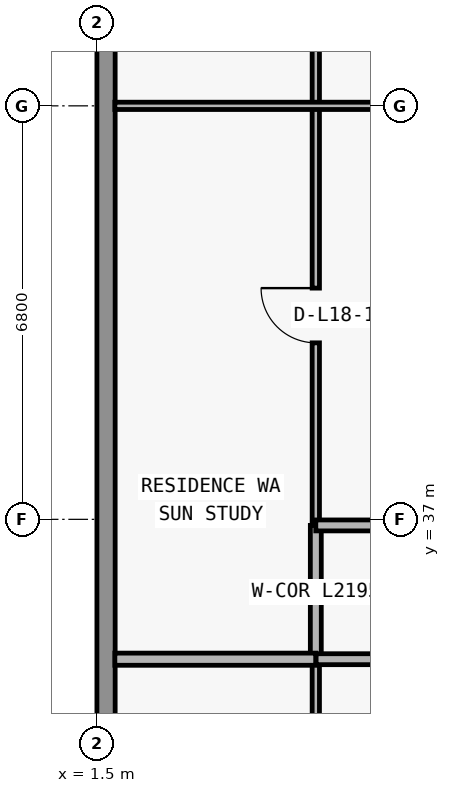
"""IFC4 building model, lengths in metres.
Left out: names, types, materials, properties, quantities, classifications, styles, units other than length and angle.
Written with IfcOpenShell. Run it as: python <this file> out.ifc"""

import sys

from ifc_helpers import new_model, si_unit, direction, frame, frame_2d, origin, place, context, subcontext, project, spatial, rectangle, extrude, element, fill, save


model = new_model("IFC4")
c1 = context("Model", 3, precision=1e-05, world=origin(), true_north=direction((0.0, 1.0)))
c2 = subcontext(c1, "Body", "Model", "MODEL_VIEW")
j1 = project(units=[si_unit("LENGTHUNIT", "METRE"), si_unit("PLANEANGLEUNIT", "RADIAN")], contexts=[c1])
p1 = place(None, origin())
s1 = spatial("IfcSite", under=j1, at=p1, CompositionType="ELEMENT")
p2 = place(p1, origin())
s2 = spatial("IfcBuilding", under=s1, at=p2, CompositionType="ELEMENT")
p3 = place(p2, frame((0.0, 0.0, 69.6)))
s3 = spatial("IfcBuildingStorey", under=s2, at=p3, CompositionType="ELEMENT", Elevation=69.6)
p4 = place(p3, frame((1.65, 26.8, 0.0), z_axis=(0.0, 0.0, 1.0), x_axis=(0.0, 1.0, 0.0)))
e1 = element("IfcWall", 1, at=p4, inside=s3, PredefinedType="STANDARD", context=c2, shape_type="SweptSolid", body=[
    extrude(rectangle(XDim=20.6, YDim=0.3, at=frame_2d((10.3, 0.0))), origin(), (0.0, 0.0, 1.0), 3.05),
])
p5 = place(p3, frame((5.1, 26.44, 0.0), z_axis=(0.0, 0.0, 1.0), x_axis=(0.0, 1.0, 0.0)))
e2 = element("IfcWall", 2, at=p5, inside=s3, PredefinedType="PARTITIONING", context=c2, shape_type="SweptSolid", body=[
    extrude(rectangle(XDim=8.26, YDim=0.12, at=frame_2d((4.13, 0.0))), origin(), (0.0, 0.0, 1.0), 3.05),
])
p6 = place(p3, frame((5.1, 34.705, 0.0), z_axis=(0.0, 0.0, 1.0), x_axis=(0.0, 1.0, 0.0)))
e3 = element("IfcWall", 3, at=p6, inside=s3, PredefinedType="PARTITIONING", context=c2, shape_type="SweptSolid", body=[
    extrude(rectangle(XDim=2.195, YDim=0.18, at=frame_2d((1.097, 0.0))), origin(), (0.0, 0.0, 1.0), 3.05),
])
p7 = place(p3, frame((5.1, 36.905, 0.0), z_axis=(0.0, 0.0, 1.0), x_axis=(0.0, 1.0, 0.0)))
e4 = element("IfcWall", 4, at=p7, inside=s3, PredefinedType="PARTITIONING", context=c2, shape_type="SweptSolid", body=[
    extrude(rectangle(XDim=10.375, YDim=0.12, at=frame_2d((5.188, 0.0))), origin(), (0.0, 0.0, 1.0), 3.05),
])
p8 = place(p7, frame((2.998, 0.0, 0.0)))
e5 = element("IfcOpeningElement", 5, at=p8, cuts=e4, PredefinedType="OPENING", context=c2, shape_type="SweptSolid", body=[
    extrude(rectangle(XDim=0.9, YDim=2.15, at=frame_2d((0.45, 1.075))), frame((0.0, 0.07, 0.0), z_axis=(0.0, -1.0, 0.0), x_axis=(1.0, 0.0, 0.0)), (0.0, 0.0, 1.0), 0.14),
])
p9 = place(p7, frame((8.185, 0.0, 0.0)))
e6 = element("IfcOpeningElement", 6, at=p9, cuts=e4, PredefinedType="OPENING", context=c2, shape_type="SweptSolid", body=[
    extrude(rectangle(XDim=0.9, YDim=2.15, at=frame_2d((0.45, 1.075))), frame((0.0, 0.07, 0.0), z_axis=(0.0, -1.0, 0.0), x_axis=(1.0, 0.0, 0.0)), (0.0, 0.0, 1.0), 0.14),
])
p10 = place(p3, frame((1.795, 34.7, 0.0), z_axis=(0.0, 0.0, 1.0), x_axis=(1.0, 0.0, 0.0)))
e7 = element("IfcWall", 7, at=p10, inside=s3, PredefinedType="PARTITIONING", context=c2, shape_type="SweptSolid", body=[
    extrude(rectangle(XDim=3.305, YDim=0.2, at=frame_2d((1.653, 0.0))), origin(), (0.0, 0.0, 1.0), 3.05),
])
p11 = place(p3, frame((5.105, 34.7, 0.0), z_axis=(0.0, 0.0, 1.0), x_axis=(1.0, 0.0, 0.0)))
e8 = element("IfcWall", 8, at=p11, inside=s3, PredefinedType="PARTITIONING", context=c2, shape_type="SweptSolid", body=[
    extrude(rectangle(XDim=67.595, YDim=0.18, at=frame_2d((33.797, 0.0))), origin(), (0.0, 0.0, 1.0), 3.05),
])
p12 = place(p11, frame((7.67, 0.0, 0.0)))
e9 = element("IfcOpeningElement", 9, at=p12, cuts=e8, PredefinedType="OPENING", context=c2, shape_type="SweptSolid", body=[
    extrude(rectangle(XDim=1.0, YDim=2.2, at=frame_2d((0.5, 1.1))), frame((0.0, 0.1, 0.0), z_axis=(0.0, -1.0, 0.0), x_axis=(1.0, 0.0, 0.0)), (0.0, 0.0, 1.0), 0.2),
])
p13 = place(p11, frame((16.07, 0.0, 0.0)))
e10 = element("IfcOpeningElement", 10, at=p13, cuts=e8, PredefinedType="OPENING", context=c2, shape_type="SweptSolid", body=[
    extrude(rectangle(XDim=1.0, YDim=2.2, at=frame_2d((0.5, 1.1))), frame((0.0, 0.1, 0.0), z_axis=(0.0, -1.0, 0.0), x_axis=(1.0, 0.0, 0.0)), (0.0, 0.0, 1.0), 0.2),
])
p14 = place(p11, frame((24.47, 0.0, 0.0)))
e11 = element("IfcOpeningElement", 11, at=p14, cuts=e8, PredefinedType="OPENING", context=c2, shape_type="SweptSolid", body=[
    extrude(rectangle(XDim=1.0, YDim=2.2, at=frame_2d((0.5, 1.1))), frame((0.0, 0.1, 0.0), z_axis=(0.0, -1.0, 0.0), x_axis=(1.0, 0.0, 0.0)), (0.0, 0.0, 1.0), 0.2),
])
p15 = place(p11, frame((32.47, 0.0, 0.0)))
e12 = element("IfcOpeningElement", 12, at=p15, cuts=e8, PredefinedType="OPENING", context=c2, shape_type="SweptSolid", body=[
    extrude(rectangle(XDim=1.0, YDim=2.2, at=frame_2d((0.5, 1.1))), frame((0.0, 0.1, 0.0), z_axis=(0.0, -1.0, 0.0), x_axis=(1.0, 0.0, 0.0)), (0.0, 0.0, 1.0), 0.2),
])
p16 = place(p11, frame((40.47, 0.0, 0.0)))
e13 = element("IfcOpeningElement", 13, at=p16, cuts=e8, PredefinedType="OPENING", context=c2, shape_type="SweptSolid", body=[
    extrude(rectangle(XDim=1.0, YDim=2.2, at=frame_2d((0.5, 1.1))), frame((0.0, 0.1, 0.0), z_axis=(0.0, -1.0, 0.0), x_axis=(1.0, 0.0, 0.0)), (0.0, 0.0, 1.0), 0.2),
])
p17 = place(p11, frame((48.87, 0.0, 0.0)))
e14 = element("IfcOpeningElement", 14, at=p17, cuts=e8, PredefinedType="OPENING", context=c2, shape_type="SweptSolid", body=[
    extrude(rectangle(XDim=1.0, YDim=2.2, at=frame_2d((0.5, 1.1))), frame((0.0, 0.1, 0.0), z_axis=(0.0, -1.0, 0.0), x_axis=(1.0, 0.0, 0.0)), (0.0, 0.0, 1.0), 0.2),
])
p18 = place(p11, frame((57.27, 0.0, 0.0)))
e15 = element("IfcOpeningElement", 15, at=p18, cuts=e8, PredefinedType="OPENING", context=c2, shape_type="SweptSolid", body=[
    extrude(rectangle(XDim=1.0, YDim=2.2, at=frame_2d((0.5, 1.1))), frame((0.0, 0.1, 0.0), z_axis=(0.0, -1.0, 0.0), x_axis=(1.0, 0.0, 0.0)), (0.0, 0.0, 1.0), 0.2),
])
p19 = place(p3, frame((5.1, 36.9, 0.0), z_axis=(0.0, 0.0, 1.0), x_axis=(1.0, 0.0, 0.0)))
e16 = element("IfcWall", 16, at=p19, inside=s3, PredefinedType="PARTITIONING", context=c2, shape_type="SweptSolid", body=[
    extrude(rectangle(XDim=12.645, YDim=0.18, at=frame_2d((6.323, 0.0))), origin(), (0.0, 0.0, 1.0), 3.05),
])
p20 = place(p19, frame((7.125, 0.0, 0.0)))
e17 = element("IfcOpeningElement", 17, at=p20, cuts=e16, PredefinedType="OPENING", context=c2, shape_type="SweptSolid", body=[
    extrude(rectangle(XDim=1.0, YDim=2.2, at=frame_2d((0.5, 1.1))), frame((0.0, 0.1, 0.0), z_axis=(0.0, -1.0, 0.0), x_axis=(1.0, 0.0, 0.0)), (0.0, 0.0, 1.0), 0.2),
])
p21 = place(p3, frame((1.795, 43.8, 0.0), z_axis=(0.0, 0.0, 1.0), x_axis=(1.0, 0.0, 0.0)))
e18 = element("IfcWall", 18, at=p21, inside=s3, PredefinedType="PARTITIONING", context=c2, shape_type="SweptSolid", body=[
    extrude(rectangle(XDim=15.96, YDim=0.12, at=frame_2d((7.98, 0.0))), origin(), (0.0, 0.0, 1.0), 2.339),
])
p22 = place(p21, frame((5.255, 0.0, 0.0)))
e19 = element("IfcOpeningElement", 19, at=p22, cuts=e18, PredefinedType="OPENING", context=c2, shape_type="SweptSolid", body=[
    extrude(rectangle(XDim=0.9, YDim=2.15, at=frame_2d((0.45, 1.075))), frame((0.0, 0.07, 0.0), z_axis=(0.0, -1.0, 0.0), x_axis=(1.0, 0.0, 0.0)), (0.0, 0.0, 1.0), 0.14),
])
p23 = place(p21, frame((10.48, 0.0, 0.0)))
e20 = element("IfcOpeningElement", 20, at=p23, cuts=e18, PredefinedType="OPENING", context=c2, shape_type="SweptSolid", body=[
    extrude(rectangle(XDim=0.9, YDim=2.15, at=frame_2d((0.45, 1.075))), frame((0.0, 0.07, 0.0), z_axis=(0.0, -1.0, 0.0), x_axis=(1.0, 0.0, 0.0)), (0.0, 0.0, 1.0), 0.14),
])
p24 = place(p21, frame((14.433, 0.0, 0.0)))
e21 = element("IfcOpeningElement", 21, at=p24, cuts=e18, PredefinedType="OPENING", context=c2, shape_type="SweptSolid", body=[
    extrude(rectangle(XDim=0.85, YDim=2.1, at=frame_2d((0.425, 1.05))), frame((0.0, 0.07, 0.0), z_axis=(0.0, -1.0, 0.0), x_axis=(1.0, 0.0, 0.0)), (0.0, 0.0, 1.0), 0.14),
])
p25 = place(p8, origin())
e22 = element("IfcDoor", 22, at=p25, inside=s3, OperationType="SINGLE_SWING_RIGHT", PredefinedType="DOOR", context=c2, shape_type="SweptSolid", body=[
    extrude(rectangle(XDim=0.9, YDim=2.15, at=frame_2d((0.45, 1.075))), frame((0.0, 0.025, 0.0), z_axis=(0.0, -1.0, 0.0), x_axis=(1.0, 0.0, 0.0)), (0.0, 0.0, 1.0), 0.05),
])
fill(e5, e22)
save(model, sys.argv[1])
